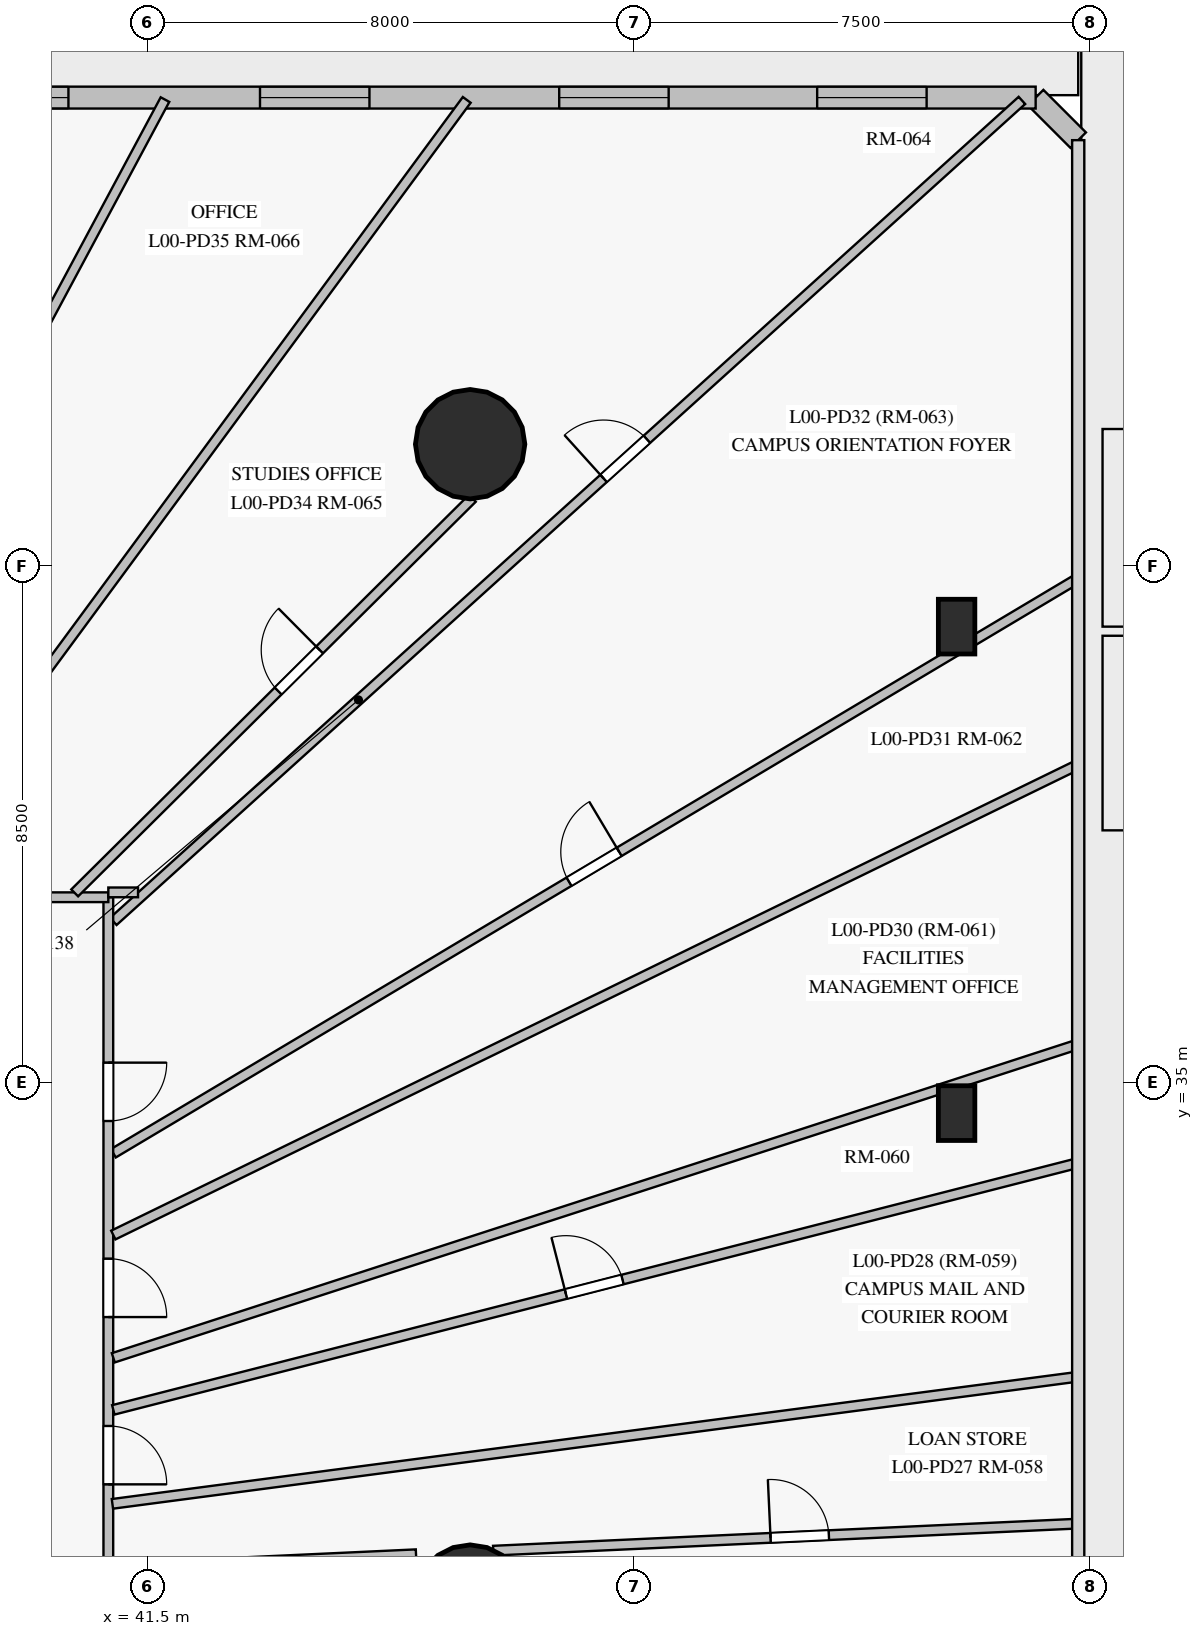
"""IFC4 building model, lengths in metres.
Left out: names, types, materials, properties, quantities, classifications, styles, units other than length and angle.
Written with IfcOpenShell. Run it as: python <this file> out.ifc"""

import sys

from ifc_helpers import new_model, si_unit, direction, frame, frame_2d, origin, origin_with_axes, origin_2d, place, context, subcontext, project, spatial, rectangle, circle, extrude, source, transform, mapped, element, fill, save


model = new_model("IFC4")
c1 = context("Model", 3, precision=1e-05, world=origin(), true_north=direction((0.0, 1.0)))
c2 = subcontext(c1, "Body", "Model", "MODEL_VIEW")
j1 = project(units=[si_unit("LENGTHUNIT", "METRE"), si_unit("PLANEANGLEUNIT", "RADIAN")], contexts=[c1])
p1 = place(None, origin())
s1 = spatial("IfcSite", under=j1, at=p1, CompositionType="ELEMENT")
p2 = place(p1, origin())
s2 = spatial("IfcBuilding", under=s1, at=p2, CompositionType="ELEMENT")
p3 = place(p2, origin())
s3 = spatial("IfcBuildingStorey", under=s2, at=p3, CompositionType="ELEMENT", Elevation=0.0)
m1 = source(origin_with_axes(), c2, "Body", "SweptSolid", [
    extrude(circle(Radius=0.9, at=origin_2d()), origin(), (0.0, 0.0, 1.0), 4.5),
])
for number, where, z_axis, x_axis in (
    (1, (46.8, 26.5, 0.0), (0.0, 0.0, 1.0), (1.0, 0.0, 0.0)),
    (2, (46.8, 45.5, 0.0), (0.0, 0.0, 1.0), (1.0, 0.0, 0.0)),
):
    element("IfcColumn", number, at=place(p3, frame(where, z_axis=z_axis, x_axis=x_axis)), inside=s3, PredefinedType="COLUMN", context=c2, shape_type="MappedRepresentation", body=[
        mapped(m1, transform((0.0, 0.0, 0.0), scale=1.0)),
    ])
m2 = source(origin_with_axes(), c2, "Body", "SweptSolid", [
    extrude(rectangle(XDim=0.6, YDim=0.9, at=origin_2d()), origin(), (0.0, 0.0, 1.0), 4.5),
])
for number, where, z_axis, x_axis in (
    (3, (54.8, 34.5, 0.0), (0.0, 0.0, 1.0), (1.0, 0.0, 0.0)),
    (4, (54.8, 42.5, 0.0), (0.0, 0.0, 1.0), (1.0, 0.0, 0.0)),
):
    element("IfcColumn", number, at=place(p3, frame(where, z_axis=z_axis, x_axis=x_axis)), inside=s3, PredefinedType="PILASTER", context=c2, shape_type="MappedRepresentation", body=[
        mapped(m2, transform((0.0, 0.0, 0.0), scale=1.0)),
    ])
p4 = place(p3, frame((56.8, 50.5, 0.0), z_axis=(0.0, 0.0, 1.0), x_axis=(-0.707106781187, 0.707106781187, 0.0)))
e5 = element("IfcWall", 5, at=p4, inside=s3, PredefinedType="SOLIDWALL", context=c2, shape_type="SweptSolid", body=[
    extrude(rectangle(XDim=0.99, YDim=0.36, at=frame_2d((0.495, 0.0))), origin(), (0.0, 0.0, 1.0), 4.2),
])
p5 = place(p3, frame((1.5, 51.2, 0.0), z_axis=(0.0, 0.0, 1.0), x_axis=(1.0, 0.0, 0.0)))
e6 = element("IfcWall", 6, at=p5, inside=s3, PredefinedType="SOLIDWALL", context=c2, shape_type="SweptSolid", body=[
    extrude(rectangle(XDim=54.6, YDim=0.36, at=frame_2d((27.3, 0.0))), origin(), (0.0, 0.0, 1.0), 4.2),
])
p6 = place(p5, frame((51.007, 0.0, 0.85)))
e7 = element("IfcOpeningElement", 7, at=p6, cuts=e6, PredefinedType="OPENING", context=c2, shape_type="SweptSolid", body=[
    extrude(rectangle(XDim=1.8, YDim=2.2, at=frame_2d((0.9, 1.1))), frame((0.0, 0.19, 0.0), z_axis=(0.0, -1.0, 0.0), x_axis=(1.0, 0.0, 0.0)), (0.0, 0.0, 1.0), 0.38),
])
p7 = place(p5, frame((46.765, 0.0, 0.85)))
e8 = element("IfcOpeningElement", 8, at=p7, cuts=e6, PredefinedType="OPENING", context=c2, shape_type="SweptSolid", body=[
    extrude(rectangle(XDim=1.8, YDim=2.2, at=frame_2d((0.9, 1.1))), frame((0.0, 0.19, 0.0), z_axis=(0.0, -1.0, 0.0), x_axis=(1.0, 0.0, 0.0)), (0.0, 0.0, 1.0), 0.38),
])
p8 = place(p5, frame((41.844, 0.0, 0.85)))
e9 = element("IfcOpeningElement", 9, at=p8, cuts=e6, PredefinedType="OPENING", context=c2, shape_type="SweptSolid", body=[
    extrude(rectangle(XDim=1.8, YDim=2.2, at=frame_2d((0.9, 1.1))), frame((0.0, 0.19, 0.0), z_axis=(0.0, -1.0, 0.0), x_axis=(1.0, 0.0, 0.0)), (0.0, 0.0, 1.0), 0.38),
])
p9 = place(p5, frame((36.894, 0.0, 0.85)))
e10 = element("IfcOpeningElement", 10, at=p9, cuts=e6, PredefinedType="OPENING", context=c2, shape_type="SweptSolid", body=[
    extrude(rectangle(XDim=1.8, YDim=2.2, at=frame_2d((0.9, 1.1))), frame((0.0, 0.19, 0.0), z_axis=(0.0, -1.0, 0.0), x_axis=(1.0, 0.0, 0.0)), (0.0, 0.0, 1.0), 0.38),
])
p10 = place(p5, frame((29.542, 0.0, 0.85)))
e11 = element("IfcOpeningElement", 11, at=p10, cuts=e6, PredefinedType="OPENING", context=c2, shape_type="SweptSolid", body=[
    extrude(rectangle(XDim=1.8, YDim=2.2, at=frame_2d((0.9, 1.1))), frame((0.0, 0.19, 0.0), z_axis=(0.0, -1.0, 0.0), x_axis=(1.0, 0.0, 0.0)), (0.0, 0.0, 1.0), 0.38),
])
p11 = place(p5, frame((25.094, 0.0, 0.85)))
e12 = element("IfcOpeningElement", 12, at=p11, cuts=e6, PredefinedType="OPENING", context=c2, shape_type="SweptSolid", body=[
    extrude(rectangle(XDim=1.8, YDim=2.2, at=frame_2d((0.9, 1.1))), frame((0.0, 0.19, 0.0), z_axis=(0.0, -1.0, 0.0), x_axis=(1.0, 0.0, 0.0)), (0.0, 0.0, 1.0), 0.38),
])
p12 = place(p5, frame((11.445, 0.0, 0.85)))
e13 = element("IfcOpeningElement", 13, at=p12, cuts=e6, PredefinedType="OPENING", context=c2, shape_type="SweptSolid", body=[
    extrude(rectangle(XDim=1.8, YDim=2.2, at=frame_2d((0.9, 1.1))), frame((0.0, 0.19, 0.0), z_axis=(0.0, -1.0, 0.0), x_axis=(1.0, 0.0, 0.0)), (0.0, 0.0, 1.0), 0.38),
])
p13 = place(p5, frame((2.908, 0.0, 0.85)))
e14 = element("IfcOpeningElement", 14, at=p13, cuts=e6, PredefinedType="OPENING", context=c2, shape_type="SweptSolid", body=[
    extrude(rectangle(XDim=1.8, YDim=2.2, at=frame_2d((0.9, 1.1))), frame((0.0, 0.19, 0.0), z_axis=(0.0, -1.0, 0.0), x_axis=(1.0, 0.0, 0.0)), (0.0, 0.0, 1.0), 0.38),
])
p14 = place(p5, frame((19.6, 0.0, 0.0)))
e15 = element("IfcOpeningElement", 15, at=p14, cuts=e6, PredefinedType="OPENING", context=c2, shape_type="SweptSolid", body=[
    extrude(rectangle(XDim=1.8, YDim=2.3, at=frame_2d((0.9, 1.15))), frame((0.0, 0.19, 0.0), z_axis=(0.0, -1.0, 0.0), x_axis=(1.0, 0.0, 0.0)), (0.0, 0.0, 1.0), 0.38),
])
p15 = place(p5, frame((22.2, 0.0, 0.0)))
e16 = element("IfcOpeningElement", 16, at=p15, cuts=e6, PredefinedType="OPENING", context=c2, shape_type="SweptSolid", body=[
    extrude(rectangle(XDim=1.8, YDim=2.3, at=frame_2d((0.9, 1.15))), frame((0.0, 0.19, 0.0), z_axis=(0.0, -1.0, 0.0), x_axis=(1.0, 0.0, 0.0)), (0.0, 0.0, 1.0), 0.38),
])
p16 = place(p5, frame((15.5, 0.0, 0.0)))
e17 = element("IfcOpeningElement", 17, at=p16, cuts=e6, PredefinedType="OPENING", context=c2, shape_type="SweptSolid", body=[
    extrude(rectangle(XDim=1.8, YDim=2.3, at=frame_2d((0.9, 1.15))), frame((0.0, 0.19, 0.0), z_axis=(0.0, -1.0, 0.0), x_axis=(1.0, 0.0, 0.0)), (0.0, 0.0, 1.0), 0.38),
])
p17 = place(p3, frame((40.932, 37.652, 0.0), z_axis=(0.0, 0.0, 1.0), x_axis=(0.741982219561, 0.670419559571, 0.0)))
e18 = element("IfcWall", 18, at=p17, inside=s3, PredefinedType="PARTITIONING", context=c2, shape_type="SweptSolid", body=[
    extrude(rectangle(XDim=20.138, YDim=0.16, at=frame_2d((10.069, 0.0))), origin(), (0.0, 0.0, 1.0), 4.2),
])
p18 = place(p17, frame((10.867, 0.0, 0.0)))
e19 = element("IfcOpeningElement", 19, at=p18, cuts=e18, PredefinedType="OPENING", context=c2, shape_type="SweptSolid", body=[
    extrude(rectangle(XDim=0.96, YDim=2.15, at=frame_2d((0.48, 1.075))), frame((0.0, 0.09, 0.0), z_axis=(0.0, -1.0, 0.0), x_axis=(1.0, 0.0, 0.0)), (0.0, 0.0, 1.0), 0.18),
])
p19 = place(p3, frame((40.932, 33.839, 0.0), z_axis=(0.0, 0.0, 1.0), x_axis=(0.859023594577, 0.51193599596, 0.0)))
e20 = element("IfcWall", 20, at=p19, inside=s3, PredefinedType="PARTITIONING", context=c2, shape_type="SweptSolid", body=[
    extrude(rectangle(XDim=18.433, YDim=0.16, at=frame_2d((9.216, 0.0))), origin(), (0.0, 0.0, 1.0), 4.2),
])
p20 = place(p19, frame((8.724, 0.0, 0.0)))
e21 = element("IfcOpeningElement", 21, at=p20, cuts=e20, PredefinedType="OPENING", context=c2, shape_type="SweptSolid", body=[
    extrude(rectangle(XDim=0.96, YDim=2.15, at=frame_2d((0.48, 1.075))), frame((0.0, 0.09, 0.0), z_axis=(0.0, -1.0, 0.0), x_axis=(1.0, 0.0, 0.0)), (0.0, 0.0, 1.0), 0.18),
])
p21 = place(p3, frame((40.85, 38.05, 0.0), z_axis=(0.0, 0.0, 1.0), x_axis=(0.0, -1.0, 0.0)))
e22 = element("IfcWall", 22, at=p21, inside=s3, PredefinedType="PARTITIONING", context=c2, shape_type="SweptSolid", body=[
    extrude(rectangle(XDim=18.508, YDim=0.16, at=frame_2d((9.254, 0.0))), origin(), (0.0, 0.0, 1.0), 3.25),
])
p22 = place(p21, frame((12.99, 0.0, 0.0)))
e23 = element("IfcOpeningElement", 23, at=p22, cuts=e22, PredefinedType="OPENING", context=c2, shape_type="SweptSolid", body=[
    extrude(rectangle(XDim=0.96, YDim=2.15, at=frame_2d((0.48, 1.075))), frame((0.0, 0.09, 0.0), z_axis=(0.0, -1.0, 0.0), x_axis=(1.0, 0.0, 0.0)), (0.0, 0.0, 1.0), 0.18),
])
p23 = place(p21, frame((11.446, 0.0, 0.0)))
e24 = element("IfcOpeningElement", 24, at=p23, cuts=e22, PredefinedType="OPENING", context=c2, shape_type="SweptSolid", body=[
    extrude(rectangle(XDim=0.96, YDim=2.15, at=frame_2d((0.48, 1.075))), frame((0.0, 0.09, 0.0), z_axis=(0.0, -1.0, 0.0), x_axis=(1.0, 0.0, 0.0)), (0.0, 0.0, 1.0), 0.18),
])
p24 = place(p21, frame((8.695, 0.0, 0.0)))
e25 = element("IfcOpeningElement", 25, at=p24, cuts=e22, PredefinedType="OPENING", context=c2, shape_type="SweptSolid", body=[
    extrude(rectangle(XDim=0.96, YDim=2.15, at=frame_2d((0.48, 1.075))), frame((0.0, 0.09, 0.0), z_axis=(0.0, -1.0, 0.0), x_axis=(1.0, 0.0, 0.0)), (0.0, 0.0, 1.0), 0.18),
])
p25 = place(p21, frame((5.944, 0.0, 0.0)))
e26 = element("IfcOpeningElement", 26, at=p25, cuts=e22, PredefinedType="OPENING", context=c2, shape_type="SweptSolid", body=[
    extrude(rectangle(XDim=0.96, YDim=2.15, at=frame_2d((0.48, 1.075))), frame((0.0, 0.09, 0.0), z_axis=(0.0, -1.0, 0.0), x_axis=(1.0, 0.0, 0.0)), (0.0, 0.0, 1.0), 0.18),
])
p26 = place(p21, frame((2.72, 0.0, 0.0)))
e27 = element("IfcOpeningElement", 27, at=p26, cuts=e22, PredefinedType="OPENING", context=c2, shape_type="SweptSolid", body=[
    extrude(rectangle(XDim=0.96, YDim=2.15, at=frame_2d((0.48, 1.075))), frame((0.0, 0.09, 0.0), z_axis=(0.0, -1.0, 0.0), x_axis=(1.0, 0.0, 0.0)), (0.0, 0.0, 1.0), 0.18),
])
p27 = place(p3, frame((40.932, 32.495, 0.0), z_axis=(0.0, 0.0, 1.0), x_axis=(0.898852728793, 0.438250809403, 0.0)))
e28 = element("IfcWall", 28, at=p27, inside=s3, PredefinedType="PARTITIONING", context=c2, shape_type="SweptSolid", body=[
    extrude(rectangle(XDim=17.619, YDim=0.16, at=frame_2d((8.809, 0.0))), origin(), (0.0, 0.0, 1.0), 4.2),
])
p28 = place(p3, frame((40.932, 30.476, 0.0), z_axis=(0.0, 0.0, 1.0), x_axis=(0.951055611127, 0.309019780181, 0.0)))
e29 = element("IfcWall", 29, at=p28, inside=s3, PredefinedType="PARTITIONING", context=c2, shape_type="SweptSolid", body=[
    extrude(rectangle(XDim=16.655, YDim=0.16, at=frame_2d((8.328, 0.0))), origin(), (0.0, 0.0, 1.0), 3.7),
])
p29 = place(p3, frame((40.932, 29.62, 0.0), z_axis=(0.0, 0.0, 1.0), x_axis=(0.968775770521, 0.247938513451, 0.0)))
e30 = element("IfcWall", 30, at=p29, inside=s3, PredefinedType="PARTITIONING", context=c2, shape_type="SweptSolid", body=[
    extrude(rectangle(XDim=16.352, YDim=0.16, at=frame_2d((8.176, 0.0))), origin(), (0.0, 0.0, 1.0), 3.7),
])
p30 = place(p29, frame((7.683, 0.0, 0.0)))
e31 = element("IfcOpeningElement", 31, at=p30, cuts=e30, PredefinedType="OPENING", context=c2, shape_type="SweptSolid", body=[
    extrude(rectangle(XDim=0.96, YDim=2.15, at=frame_2d((0.48, 1.075))), frame((0.0, 0.09, 0.0), z_axis=(0.0, -1.0, 0.0), x_axis=(1.0, 0.0, 0.0)), (0.0, 0.0, 1.0), 0.18),
])
p31 = place(p3, frame((37.144, 38.132, 0.0), z_axis=(0.0, 0.0, 1.0), x_axis=(0.593152727381, 0.805089958949, 0.0)))
e32 = element("IfcWall", 32, at=p31, inside=s3, PredefinedType="PARTITIONING", context=c2, shape_type="SweptSolid", body=[
    extrude(rectangle(XDim=16.185, YDim=0.16, at=frame_2d((8.092, 0.0))), origin(), (0.0, 0.0, 1.0), 4.2),
])
p32 = place(p3, frame((40.917, 28.074, 0.0), z_axis=(0.0, 0.0, 1.0), x_axis=(0.991445045126, 0.130524796478, 0.0)))
e33 = element("IfcWall", 33, at=p32, inside=s3, PredefinedType="PARTITIONING", context=c2, shape_type="SweptSolid", body=[
    extrude(rectangle(XDim=15.994, YDim=0.16, at=frame_2d((7.997, 0.0))), origin(), (0.0, 0.0, 1.0), 3.7),
])
p33 = place(p3, frame((25.6, 38.05, 0.0), z_axis=(0.0, 0.0, 1.0), x_axis=(1.0, 0.0, 0.0)))
e34 = element("IfcWall", 34, at=p33, inside=s3, PredefinedType="PARTITIONING", context=c2, shape_type="SweptSolid", body=[
    extrude(rectangle(XDim=15.25, YDim=0.16, at=frame_2d((7.625, 0.0))), origin(), (0.0, 0.0, 1.0), 4.2),
])
p34 = place(p33, frame((9.677, 0.0, 0.0)))
e35 = element("IfcOpeningElement", 35, at=p34, cuts=e34, PredefinedType="OPENING", context=c2, shape_type="SweptSolid", body=[
    extrude(rectangle(XDim=0.96, YDim=2.15, at=frame_2d((0.48, 1.075))), frame((0.0, 0.09, 0.0), z_axis=(0.0, -1.0, 0.0), x_axis=(1.0, 0.0, 0.0)), (0.0, 0.0, 1.0), 0.18),
])
p35 = place(p33, frame((7.15, 0.0, 0.0)))
e36 = element("IfcOpeningElement", 36, at=p35, cuts=e34, PredefinedType="OPENING", context=c2, shape_type="SweptSolid", body=[
    extrude(rectangle(XDim=0.96, YDim=2.15, at=frame_2d((0.48, 1.075))), frame((0.0, 0.09, 0.0), z_axis=(0.0, -1.0, 0.0), x_axis=(1.0, 0.0, 0.0)), (0.0, 0.0, 1.0), 0.18),
])
p36 = place(p33, frame((4.573, 0.0, 0.0)))
e37 = element("IfcOpeningElement", 37, at=p36, cuts=e34, PredefinedType="OPENING", context=c2, shape_type="SweptSolid", body=[
    extrude(rectangle(XDim=0.96, YDim=2.15, at=frame_2d((0.48, 1.075))), frame((0.0, 0.09, 0.0), z_axis=(0.0, -1.0, 0.0), x_axis=(1.0, 0.0, 0.0)), (0.0, 0.0, 1.0), 0.18),
])
p37 = place(p3, frame((34.792, 38.119, 0.0), z_axis=(0.0, 0.0, 1.0), x_axis=(0.472198527924, 0.881492229249, 0.0)))
e38 = element("IfcWall", 38, at=p37, inside=s3, PredefinedType="PARTITIONING", context=c2, shape_type="SweptSolid", body=[
    extrude(rectangle(XDim=14.802, YDim=0.16, at=frame_2d((7.401, 0.0))), origin(), (0.0, 0.0, 1.0), 4.2),
])
p38 = place(p3, frame((40.297, 38.121, 0.0), z_axis=(0.0, 0.0, 1.0), x_axis=(0.709818075558, 0.704385050673, 0.0)))
e39 = element("IfcWall", 39, at=p38, inside=s3, PredefinedType="PARTITIONING", context=c2, shape_type="SweptSolid", body=[
    extrude(rectangle(XDim=9.212, YDim=0.16, at=frame_2d((4.606, 0.0))), origin(), (0.0, 0.0, 1.0), 3.25),
])
p39 = place(p38, frame((4.713, 0.0, 0.0)))
e40 = element("IfcOpeningElement", 40, at=p39, cuts=e39, PredefinedType="OPENING", context=c2, shape_type="SweptSolid", body=[
    extrude(rectangle(XDim=0.96, YDim=2.15, at=frame_2d((0.48, 1.075))), frame((0.0, 0.09, 0.0), z_axis=(0.0, -1.0, 0.0), x_axis=(1.0, 0.0, 0.0)), (0.0, 0.0, 1.0), 0.18),
])
p40 = place(p3, frame((47.18, 27.304, 0.0), z_axis=(0.0, 0.0, 1.0), x_axis=(0.998931741593, 0.04621012484, 0.0)))
e41 = element("IfcWall", 41, at=p40, inside=s3, PredefinedType="PARTITIONING", context=c2, shape_type="SweptSolid", body=[
    extrude(rectangle(XDim=9.605, YDim=0.16, at=frame_2d((4.802, 0.0))), origin(), (0.0, 0.0, 1.0), 3.7),
])
p41 = place(p40, frame((4.565, 0.0, 0.0)))
e42 = element("IfcOpeningElement", 42, at=p41, cuts=e41, PredefinedType="OPENING", context=c2, shape_type="SweptSolid", body=[
    extrude(rectangle(XDim=0.96, YDim=2.15, at=frame_2d((0.48, 1.075))), frame((0.0, 0.09, 0.0), z_axis=(0.0, -1.0, 0.0), x_axis=(1.0, 0.0, 0.0)), (0.0, 0.0, 1.0), 0.18),
])
p42 = place(p3, frame((40.917, 27.014, 0.0), z_axis=(0.0, 0.0, 1.0), x_axis=(0.998931863104, 0.046207498044, 0.0)))
e43 = element("IfcWall", 43, at=p42, inside=s3, PredefinedType="PARTITIONING", context=c2, shape_type="SweptSolid", body=[
    extrude(rectangle(XDim=4.998, YDim=0.16, at=frame_2d((2.499, 0.0))), origin(), (0.0, 0.0, 1.0), 3.25),
])
p43 = place(p3, frame((41.338, 38.13, 0.0), z_axis=(0.0, 0.0, 1.0), x_axis=(-1.0, 0.0, 0.0)))
e44 = element("IfcWall", 44, at=p43, inside=s3, PredefinedType="PARTITIONING", context=c2, shape_type="SweptSolid", body=[
    extrude(rectangle(XDim=0.488, YDim=0.16, at=frame_2d((0.244, 0.0))), origin(), (0.0, 0.0, 1.0), 4.2),
])
m3 = source(origin_with_axes(), c2, "Body", "SweptSolid", [
    extrude(rectangle(XDim=1.8, YDim=2.2, at=frame_2d((0.9, 1.1))), frame((0.0, 0.03, 0.0), z_axis=(0.0, -1.0, 0.0), x_axis=(1.0, 0.0, 0.0)), (0.0, 0.0, 1.0), 0.06),
])
p44 = place(p6, origin())
e45 = element("IfcWindow", 45, at=p44, inside=s3, PartitioningType="SINGLE_PANEL", PredefinedType="WINDOW", context=c2, shape_type="MappedRepresentation", body=[
    mapped(m3, transform((0.0, 0.0, 0.0), scale=1.0)),
])
fill(e7, e45)
p45 = place(p7, origin())
e46 = element("IfcWindow", 46, at=p45, inside=s3, PartitioningType="SINGLE_PANEL", PredefinedType="WINDOW", context=c2, shape_type="MappedRepresentation", body=[
    mapped(m3, transform((0.0, 0.0, 0.0), scale=1.0)),
])
fill(e8, e46)
p46 = place(p8, origin())
e47 = element("IfcWindow", 47, at=p46, inside=s3, PartitioningType="SINGLE_PANEL", PredefinedType="WINDOW", context=c2, shape_type="MappedRepresentation", body=[
    mapped(m3, transform((0.0, 0.0, 0.0), scale=1.0)),
])
fill(e9, e47)
p47 = place(p9, origin())
e48 = element("IfcWindow", 48, at=p47, inside=s3, PartitioningType="SINGLE_PANEL", PredefinedType="WINDOW", context=c2, shape_type="MappedRepresentation", body=[
    mapped(m3, transform((0.0, 0.0, 0.0), scale=1.0)),
])
fill(e10, e48)
m4 = source(origin_with_axes(), c2, "Body", "SweptSolid", [
    extrude(rectangle(XDim=0.96, YDim=2.15, at=frame_2d((0.48, 1.075))), frame((0.0, 0.025, 0.0), z_axis=(0.0, -1.0, 0.0), x_axis=(1.0, 0.0, 0.0)), (0.0, 0.0, 1.0), 0.05),
])
p48 = place(p41, origin())
e49 = element("IfcDoor", 49, at=p48, inside=s3, OperationType="SINGLE_SWING_LEFT", PredefinedType="DOOR", context=c2, shape_type="MappedRepresentation", body=[
    mapped(m4, transform((0.0, 0.0, 0.0), scale=1.0)),
])
fill(e42, e49)
p49 = place(p24, origin())
e50 = element("IfcDoor", 50, at=p49, inside=s3, OperationType="SINGLE_SWING_RIGHT", PredefinedType="DOOR", context=c2, shape_type="MappedRepresentation", body=[
    mapped(m4, transform((0.0, 0.0, 0.0), scale=1.0)),
])
fill(e25, e50)
p50 = place(p30, origin())
e51 = element("IfcDoor", 51, at=p50, inside=s3, OperationType="SINGLE_SWING_LEFT", PredefinedType="DOOR", context=c2, shape_type="MappedRepresentation", body=[
    mapped(m4, transform((0.0, 0.0, 0.0), scale=1.0)),
])
fill(e31, e51)
p51 = place(p25, origin())
e52 = element("IfcDoor", 52, at=p51, inside=s3, OperationType="SINGLE_SWING_RIGHT", PredefinedType="DOOR", context=c2, shape_type="MappedRepresentation", body=[
    mapped(m4, transform((0.0, 0.0, 0.0), scale=1.0)),
])
fill(e26, e52)
p52 = place(p26, origin())
e53 = element("IfcDoor", 53, at=p52, inside=s3, OperationType="SINGLE_SWING_LEFT", PredefinedType="DOOR", context=c2, shape_type="MappedRepresentation", body=[
    mapped(m4, transform((0.0, 0.0, 0.0), scale=1.0)),
])
fill(e27, e53)
p53 = place(p20, origin())
e54 = element("IfcDoor", 54, at=p53, inside=s3, OperationType="SINGLE_SWING_RIGHT", PredefinedType="DOOR", context=c2, shape_type="MappedRepresentation", body=[
    mapped(m4, transform((0.0, 0.0, 0.0), scale=1.0)),
])
fill(e21, e54)
p54 = place(p18, origin())
e55 = element("IfcDoor", 55, at=p54, inside=s3, OperationType="SINGLE_SWING_LEFT", PredefinedType="DOOR", context=c2, shape_type="MappedRepresentation", body=[
    mapped(m4, transform((0.0, 0.0, 0.0), scale=1.0)),
])
fill(e19, e55)
p55 = place(p39, origin())
e56 = element("IfcDoor", 56, at=p55, inside=s3, OperationType="SINGLE_SWING_RIGHT", PredefinedType="DOOR", context=c2, shape_type="MappedRepresentation", body=[
    mapped(m4, transform((0.0, 0.0, 0.0), scale=1.0)),
])
fill(e40, e56)
save(model, sys.argv[1])
